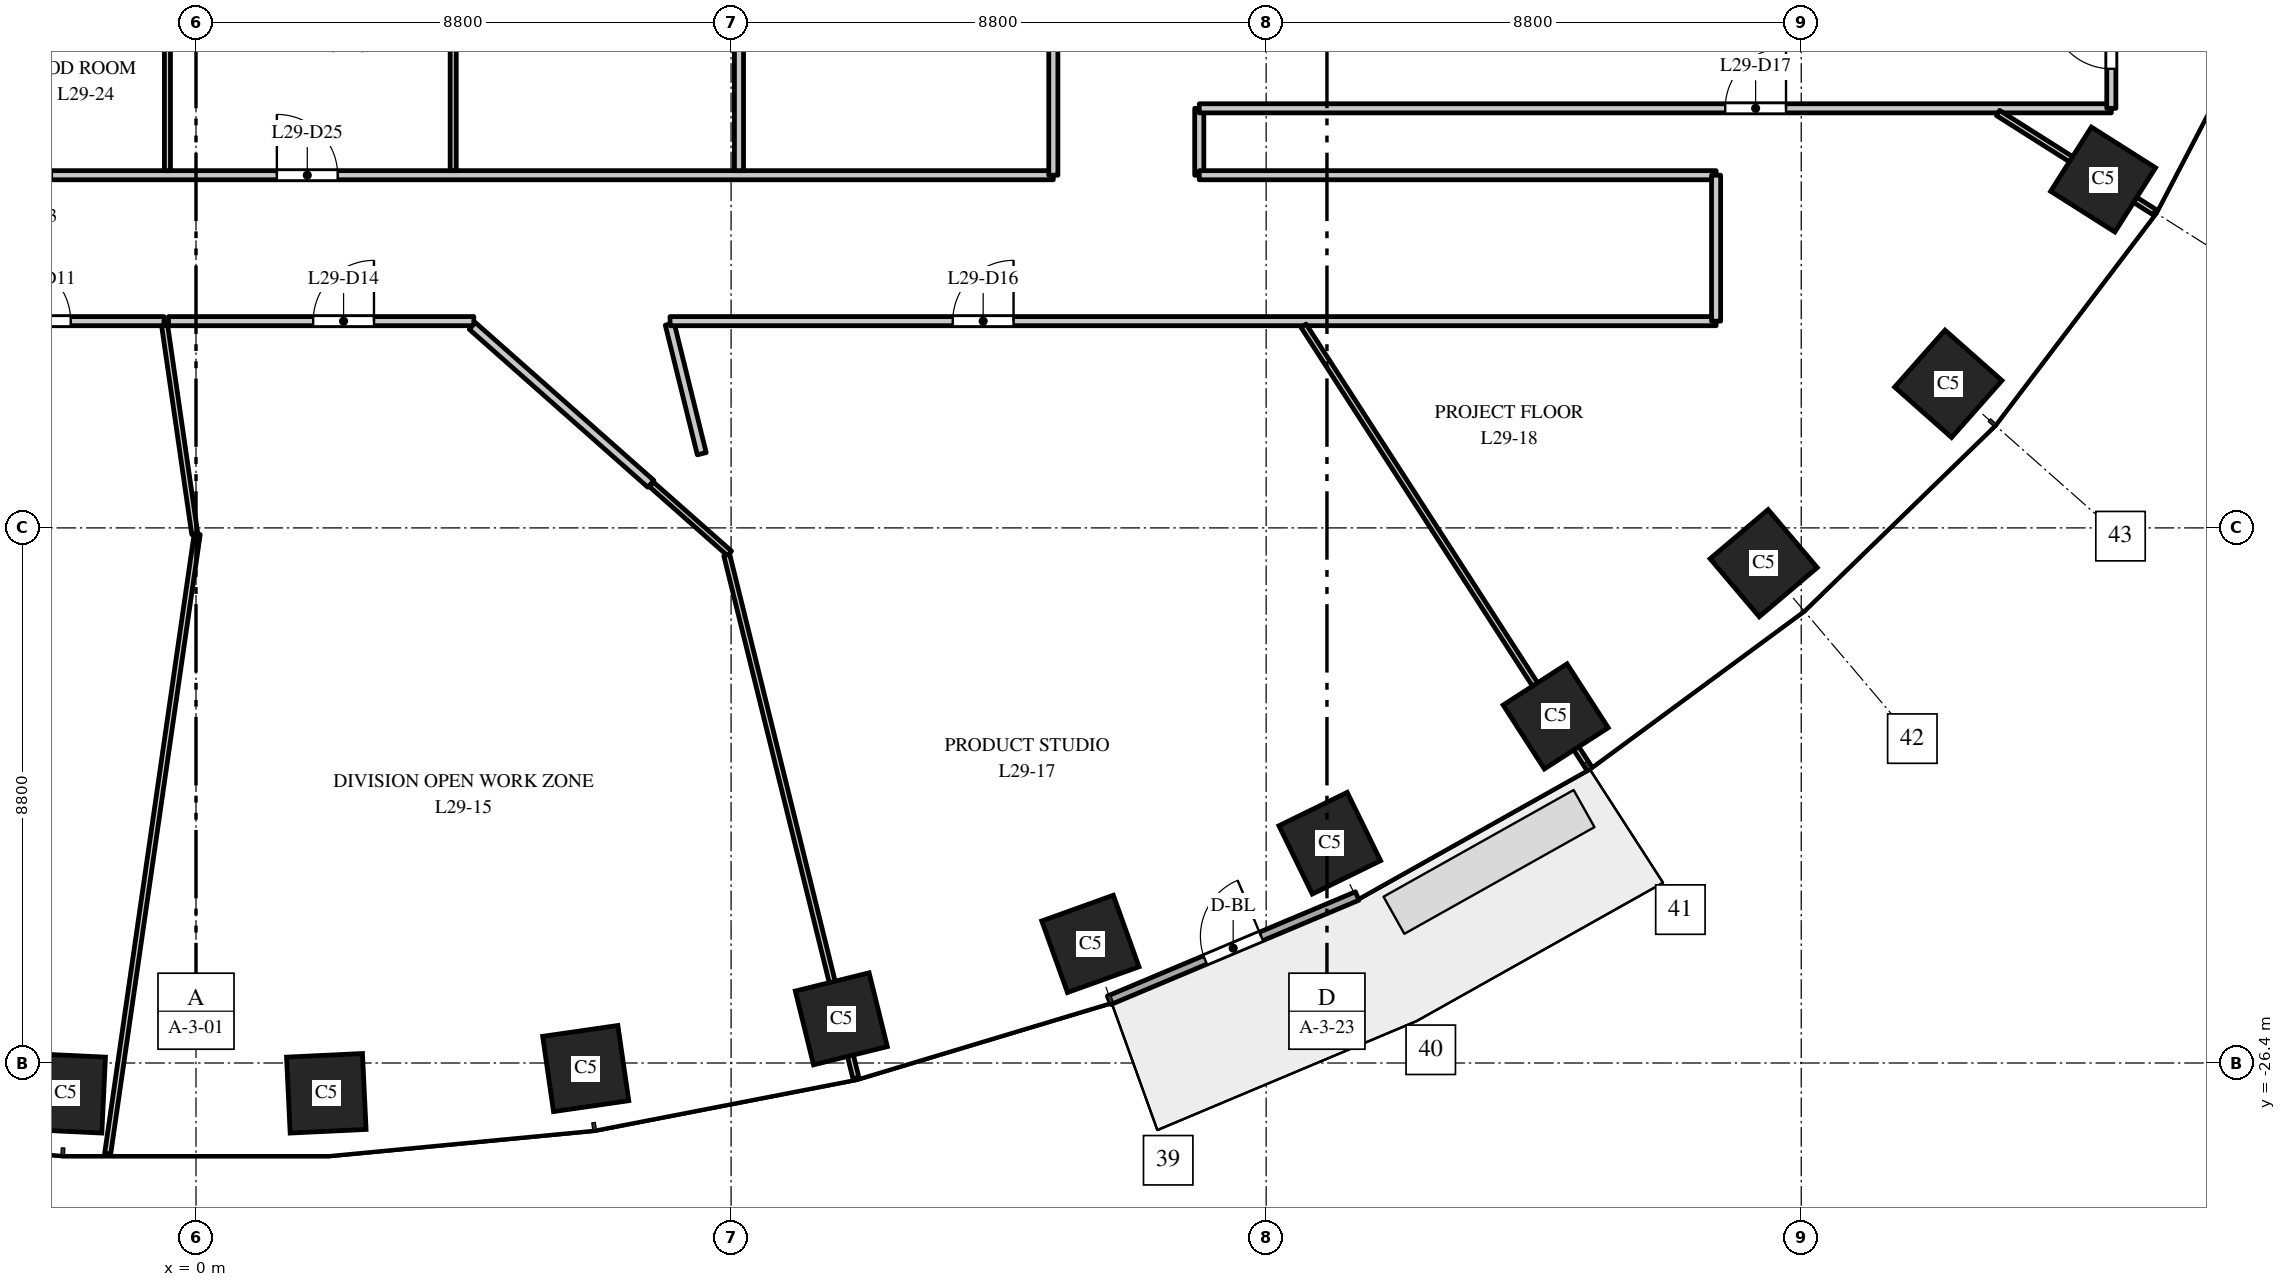
"""IFC4 building model, lengths in metres.
Left out: names, types, materials, properties, quantities, classifications, styles, units other than length and angle.
Written with IfcOpenShell. Run it as: python <this file> out.ifc"""

import sys

from ifc_helpers import new_model, si_unit, direction, frame, frame_2d, origin, origin_2d, place, context, subcontext, project, spatial, rectangle, extrude, element, fill, save


model = new_model("IFC4")
c1 = context("Model", 3, precision=1e-05, world=origin(), true_north=direction((0.0, 1.0)))
c2 = subcontext(c1, "Body", "Model", "MODEL_VIEW")
j1 = project(units=[si_unit("LENGTHUNIT", "METRE"), si_unit("PLANEANGLEUNIT", "RADIAN")], contexts=[c1])
p1 = place(None, origin())
s1 = spatial("IfcSite", under=j1, at=p1, CompositionType="ELEMENT")
p2 = place(p1, origin())
s2 = spatial("IfcBuilding", under=s1, at=p2, CompositionType="ELEMENT")
p3 = place(p2, frame((0.0, 0.0, 128.0)))
s3 = spatial("IfcBuildingStorey", under=s2, at=p3, CompositionType="ELEMENT", Elevation=128.0)
for number, where, z_axis, x_axis in (
    (1, (-2.143, -26.898, 0.0), (0.0, 0.0, 1.0), (0.999, -0.048, 0.0)),
    (2, (2.143, -26.898, 0.0), (0.0, 0.0, 1.0), (0.999, 0.048, 0.0)),
    (3, (6.409, -26.491, 0.0), (0.0, 0.0, 1.0), (0.99, 0.143, 0.0)),
    (4, (10.613, -25.674, 0.0), (0.0, 0.0, 1.0), (0.971, 0.24, 0.0)),
    (5, (14.709, -24.441, 0.0), (0.0, 0.0, 1.0), (0.941, 0.338, 0.0)),
    (6, (18.646, -22.785, 0.0), (0.0, 0.0, 1.0), (0.898, 0.439, 0.0)),
    (7, (22.362, -20.7, 0.0), (0.0, 0.0, 1.0), (0.84, 0.542, 0.0)),
    (8, (25.783, -18.18, 0.0), (0.0, 0.0, 1.0), (0.763, 0.646, 0.0)),
    (9, (28.819, -15.23, 0.0), (0.0, 0.0, 1.0), (0.663, 0.749, 0.0)),
    (10, (31.365, -11.871, 0.0), (0.0, 0.0, 1.0), (0.535, 0.845, 0.0)),
):
    element("IfcColumn", number, at=place(p3, frame(where, z_axis=z_axis, x_axis=x_axis)), inside=s3, PredefinedType="COLUMN", context=c2, shape_type="SweptSolid", body=[
        extrude(rectangle(XDim=1.25, YDim=1.25, at=origin_2d()), origin(), (0.0, 0.0, 1.0), 4.0),
    ])
p4 = place(p3, frame((15.018, -25.369, 0.0), z_axis=(0.0, 0.0, 1.0), x_axis=(0.921816985161, 0.387625393736, 0.0)))
e11 = element("IfcWall", 11, at=p4, inside=s3, PredefinedType="STANDARD", context=c2, shape_type="SweptSolid", body=[
    extrude(rectangle(XDim=4.426, YDim=0.15, at=frame_2d((2.213, 0.0))), origin(), (0.0, 0.0, 1.0), 3.7),
])
p5 = place(p4, frame((1.713, 0.0, 0.0)))
e12 = element("IfcOpeningElement", 12, at=p5, cuts=e11, PredefinedType="OPENING", context=c2, shape_type="SweptSolid", body=[
    extrude(rectangle(XDim=1.0, YDim=2.4, at=frame_2d((0.5, 1.2))), frame((0.0, 0.085, 0.0), z_axis=(0.0, -1.0, 0.0), x_axis=(1.0, 0.0, 0.0)), (0.0, 0.0, 1.0), 0.17),
])
p6 = place(p3, frame((-14.1, -11.8, 0.0), z_axis=(0.0, 0.0, 1.0), x_axis=(1.0, 0.0, 0.0)))
e13 = element("IfcWall", 13, at=p6, inside=s3, PredefinedType="PARTITIONING", context=c2, shape_type="SweptSolid", body=[
    extrude(rectangle(XDim=28.2, YDim=0.15, at=frame_2d((14.1, 0.0))), origin(), (0.0, 0.0, 1.0), 2.85),
])
p7 = place(p6, frame((6.03, 0.0, 0.0)))
e14 = element("IfcOpeningElement", 14, at=p7, cuts=e13, PredefinedType="OPENING", context=c2, shape_type="SweptSolid", body=[
    extrude(rectangle(XDim=1.0, YDim=2.1, at=frame_2d((0.5, 1.05))), frame((0.0, 0.085, 0.0), z_axis=(0.0, -1.0, 0.0), x_axis=(1.0, 0.0, 0.0)), (0.0, 0.0, 1.0), 0.17),
])
p8 = place(p6, frame((10.73, 0.0, 0.0)))
e15 = element("IfcOpeningElement", 15, at=p8, cuts=e13, PredefinedType="OPENING", context=c2, shape_type="SweptSolid", body=[
    extrude(rectangle(XDim=1.0, YDim=2.1, at=frame_2d((0.5, 1.05))), frame((0.0, 0.085, 0.0), z_axis=(0.0, -1.0, 0.0), x_axis=(1.0, 0.0, 0.0)), (0.0, 0.0, 1.0), 0.17),
])
p9 = place(p6, frame((15.43, 0.0, 0.0)))
e16 = element("IfcOpeningElement", 16, at=p9, cuts=e13, PredefinedType="OPENING", context=c2, shape_type="SweptSolid", body=[
    extrude(rectangle(XDim=1.0, YDim=2.1, at=frame_2d((0.5, 1.05))), frame((0.0, 0.085, 0.0), z_axis=(0.0, -1.0, 0.0), x_axis=(1.0, 0.0, 0.0)), (0.0, 0.0, 1.0), 0.17),
])
p10 = place(p3, frame((-10.974, -14.2, 0.0), z_axis=(0.0, 0.0, 1.0), x_axis=(1.0, 0.0, 0.0)))
e17 = element("IfcWall", 17, at=p10, inside=s3, PredefinedType="PARTITIONING", context=c2, shape_type="SweptSolid", body=[
    extrude(rectangle(XDim=10.447, YDim=0.15, at=frame_2d((5.224, 0.0))), origin(), (0.0, 0.0, 1.0), 2.85),
])
p11 = place(p10, frame((7.913, 0.0, 0.0)))
e18 = element("IfcOpeningElement", 18, at=p11, cuts=e17, PredefinedType="OPENING", context=c2, shape_type="SweptSolid", body=[
    extrude(rectangle(XDim=1.0, YDim=2.1, at=frame_2d((0.5, 1.05))), frame((0.0, 0.085, 0.0), z_axis=(0.0, -1.0, 0.0), x_axis=(1.0, 0.0, 0.0)), (0.0, 0.0, 1.0), 0.17),
])
p12 = place(p10, frame((2.835, 0.0, 0.0)))
e19 = element("IfcOpeningElement", 19, at=p12, cuts=e17, PredefinedType="OPENING", context=c2, shape_type="SweptSolid", body=[
    extrude(rectangle(XDim=1.0, YDim=2.1, at=frame_2d((0.5, 1.05))), frame((0.0, 0.085, 0.0), z_axis=(0.0, -1.0, 0.0), x_axis=(1.0, 0.0, 0.0)), (0.0, 0.0, 1.0), 0.17),
])
p13 = place(p3, frame((-1.453, -27.894, 0.0), z_axis=(0.0, 0.0, 1.0), x_axis=(0.143027592995, 0.989718701269, 0.0)))
e20 = element("IfcWall", 20, at=p13, inside=s3, PredefinedType="PARTITIONING", context=c2, shape_type="SweptSolid", body=[
    extrude(rectangle(XDim=10.298, YDim=0.1, at=frame_2d((5.149, 0.0))), origin(), (0.0, 0.0, 1.0), 2.9),
])
p14 = place(p3, frame((-0.516, -14.271, 0.0), z_axis=(0.0, 0.0, 1.0), x_axis=(0.143107167662, -0.9897071984, 0.0)))
e21 = element("IfcWall", 21, at=p14, inside=s3, PredefinedType="PARTITIONING", context=c2, shape_type="SweptSolid", body=[
    extrude(rectangle(XDim=3.467, YDim=0.1, at=frame_2d((1.733, 0.0))), origin(), (0.0, 0.0, 1.0), 3.7),
])
p15 = place(p3, frame((-0.47, -11.725, 0.0), z_axis=(0.0, 0.0, 1.0), x_axis=(0.0, 1.0, 0.0)))
e22 = element("IfcWall", 22, at=p15, inside=s3, PredefinedType="PARTITIONING", context=c2, shape_type="SweptSolid", body=[
    extrude(rectangle(XDim=4.256, YDim=0.1, at=frame_2d((2.128, 0.0))), origin(), (0.0, 0.0, 1.0), 2.9),
])
p16 = place(p3, frame((-0.452, -14.2, 0.0), z_axis=(0.0, 0.0, 1.0), x_axis=(1.0, 0.0, 0.0)))
e23 = element("IfcWall", 23, at=p16, inside=s3, PredefinedType="PARTITIONING", context=c2, shape_type="SweptSolid", body=[
    extrude(rectangle(XDim=5.021, YDim=0.15, at=frame_2d((2.51, 0.0))), origin(), (0.0, 0.0, 1.0), 2.85),
])
p17 = place(p16, frame((2.379, 0.0, 0.0)))
e24 = element("IfcOpeningElement", 24, at=p17, cuts=e23, PredefinedType="OPENING", context=c2, shape_type="SweptSolid", body=[
    extrude(rectangle(XDim=1.0, YDim=2.1, at=frame_2d((0.5, 1.05))), frame((0.0, 0.085, 0.0), z_axis=(0.0, -1.0, 0.0), x_axis=(1.0, 0.0, 0.0)), (0.0, 0.0, 1.0), 0.17),
])
p18 = place(p3, frame((4.23, -11.725, 0.0), z_axis=(0.0, 0.0, 1.0), x_axis=(0.0, 1.0, 0.0)))
e25 = element("IfcWall", 25, at=p18, inside=s3, PredefinedType="PARTITIONING", context=c2, shape_type="SweptSolid", body=[
    extrude(rectangle(XDim=5.133, YDim=0.1, at=frame_2d((2.566, 0.0))), origin(), (0.0, 0.0, 1.0), 2.9),
])
p19 = place(p3, frame((4.544, -14.278, 0.0), z_axis=(0.0, 0.0, 1.0), x_axis=(0.74902508398, -0.662541639121, 0.0)))
e26 = element("IfcWall", 26, at=p19, inside=s3, PredefinedType="PARTITIONING", context=c2, shape_type="SweptSolid", body=[
    extrude(rectangle(XDim=3.921, YDim=0.15, at=frame_2d((1.96, 0.0))), origin(), (0.0, 0.0, 1.0), 3.7),
])
p20 = place(p3, frame((7.49, -16.884, 0.0), z_axis=(0.0, 0.0, 1.0), x_axis=(0.749222216333, -0.662318707688, 0.0)))
e27 = element("IfcWall", 27, at=p20, inside=s3, PredefinedType="PARTITIONING", context=c2, shape_type="SweptSolid", body=[
    extrude(rectangle(XDim=1.714, YDim=0.1, at=frame_2d((0.857, 0.0))), origin(), (0.0, 0.0, 1.0), 3.7),
])
p21 = place(p3, frame((7.791, -14.248, 0.0), z_axis=(0.0, 0.0, 1.0), x_axis=(0.240023599191, -0.97076705333, 0.0)))
e28 = element("IfcWall", 28, at=p21, inside=s3, PredefinedType="PARTITIONING", context=c2, shape_type="SweptSolid", body=[
    extrude(rectangle(XDim=2.196, YDim=0.15, at=frame_2d((1.098, 0.0))), origin(), (0.0, 0.0, 1.0), 3.7),
])
p22 = place(p3, frame((7.796, -14.2, 0.0), z_axis=(0.0, 0.0, 1.0), x_axis=(1.0, 0.0, 0.0)))
e29 = element("IfcWall", 29, at=p22, inside=s3, PredefinedType="PARTITIONING", context=c2, shape_type="SweptSolid", body=[
    extrude(rectangle(XDim=17.204, YDim=0.15, at=frame_2d((8.602, 0.0))), origin(), (0.0, 0.0, 1.0), 2.85),
])
p23 = place(p22, frame((4.65, 0.0, 0.0)))
e30 = element("IfcOpeningElement", 30, at=p23, cuts=e29, PredefinedType="OPENING", context=c2, shape_type="SweptSolid", body=[
    extrude(rectangle(XDim=1.0, YDim=2.1, at=frame_2d((0.5, 1.05))), frame((0.0, 0.085, 0.0), z_axis=(0.0, -1.0, 0.0), x_axis=(1.0, 0.0, 0.0)), (0.0, 0.0, 1.0), 0.17),
])
p24 = place(p3, frame((8.729, -18.046, 0.0), z_axis=(0.0, 0.0, 1.0), x_axis=(0.239772155265, -0.970829188663, 0.0)))
e31 = element("IfcWall", 31, at=p24, inside=s3, PredefinedType="PARTITIONING", context=c2, shape_type="SweptSolid", body=[
    extrude(rectangle(XDim=8.858, YDim=0.1, at=frame_2d((4.429, 0.0))), origin(), (0.0, 0.0, 1.0), 2.9),
])
p25 = place(p3, frame((8.93, -11.725, 0.0), z_axis=(0.0, 0.0, 1.0), x_axis=(0.0, 1.0, 0.0)))
e32 = element("IfcWall", 32, at=p25, inside=s3, PredefinedType="PARTITIONING", context=c2, shape_type="SweptSolid", body=[
    extrude(rectangle(XDim=11.207, YDim=0.15, at=frame_2d((5.604, 0.0))), origin(), (0.0, 0.0, 1.0), 2.75),
])
p26 = place(p25, frame((4.597, 0.0, 0.0)))
e33 = element("IfcOpeningElement", 33, at=p26, cuts=e32, PredefinedType="OPENING", context=c2, shape_type="SweptSolid", body=[
    extrude(rectangle(XDim=1.0, YDim=2.1, at=frame_2d((0.5, 1.05))), frame((0.0, 0.085, 0.0), z_axis=(0.0, -1.0, 0.0), x_axis=(1.0, 0.0, 0.0)), (0.0, 0.0, 1.0), 0.17),
])
p27 = place(p3, frame((14.1, -11.8, 0.0), z_axis=(0.0, 0.0, 1.0), x_axis=(0.0, 1.0, 0.0)))
e34 = element("IfcWall", 34, at=p27, inside=s3, PredefinedType="PARTITIONING", context=c2, shape_type="SweptSolid", body=[
    extrude(rectangle(XDim=23.6, YDim=0.15, at=frame_2d((11.8, 0.0))), origin(), (0.0, 0.0, 1.0), 2.75),
])
p28 = place(p27, frame((11.2, 0.0, 0.0)))
e35 = element("IfcOpeningElement", 35, at=p28, cuts=e34, PredefinedType="OPENING", context=c2, shape_type="SweptSolid", body=[
    extrude(rectangle(XDim=1.0, YDim=2.1, at=frame_2d((0.5, 1.05))), frame((0.0, 0.085, 0.0), z_axis=(0.0, -1.0, 0.0), x_axis=(1.0, 0.0, 0.0)), (0.0, 0.0, 1.0), 0.17),
])
p29 = place(p3, frame((16.5, -11.8, 0.0), z_axis=(0.0, 0.0, 1.0), x_axis=(0.0, 1.0, 0.0)))
e36 = element("IfcWall", 36, at=p29, inside=s3, PredefinedType="PARTITIONING", context=c2, shape_type="SweptSolid", body=[
    extrude(rectangle(XDim=1.1, YDim=0.15, at=frame_2d((0.55, 0.0))), origin(), (0.0, 0.0, 1.0), 3.7),
])
p30 = place(p3, frame((16.5, -11.8, 0.0), z_axis=(0.0, 0.0, 1.0), x_axis=(1.0, 0.0, 0.0)))
e37 = element("IfcWall", 37, at=p30, inside=s3, PredefinedType="PARTITIONING", context=c2, shape_type="SweptSolid", body=[
    extrude(rectangle(XDim=8.5, YDim=0.15, at=frame_2d((4.25, 0.0))), origin(), (0.0, 0.0, 1.0), 2.75),
])
p31 = place(p3, frame((16.5, -10.7, 0.0), z_axis=(0.0, 0.0, 1.0), x_axis=(1.0, 0.0, 0.0)))
e38 = element("IfcWall", 38, at=p31, inside=s3, PredefinedType="PARTITIONING", context=c2, shape_type="SweptSolid", body=[
    extrude(rectangle(XDim=15.0, YDim=0.15, at=frame_2d((7.5, 0.0))), origin(), (0.0, 0.0, 1.0), 2.75),
])
p32 = place(p31, frame((8.65, 0.0, 0.0)))
e39 = element("IfcOpeningElement", 39, at=p32, cuts=e38, PredefinedType="OPENING", context=c2, shape_type="SweptSolid", body=[
    extrude(rectangle(XDim=1.0, YDim=2.1, at=frame_2d((0.5, 1.05))), frame((0.0, 0.085, 0.0), z_axis=(0.0, -1.0, 0.0), x_axis=(1.0, 0.0, 0.0)), (0.0, 0.0, 1.0), 0.17),
])
p33 = place(p3, frame((18.215, -14.275, 0.0), z_axis=(0.0, 0.0, 1.0), x_axis=(0.542249023969, -0.840217826521, 0.0)))
e40 = element("IfcWall", 40, at=p33, inside=s3, PredefinedType="PARTITIONING", context=c2, shape_type="SweptSolid", body=[
    extrude(rectangle(XDim=8.649, YDim=0.1, at=frame_2d((4.325, 0.0))), origin(), (0.0, 0.0, 1.0), 3.7),
])
p34 = place(p3, frame((25.0, -14.2, 0.0), z_axis=(0.0, 0.0, 1.0), x_axis=(0.0, 1.0, 0.0)))
e41 = element("IfcWall", 41, at=p34, inside=s3, PredefinedType="PARTITIONING", context=c2, shape_type="SweptSolid", body=[
    extrude(rectangle(XDim=2.4, YDim=0.15, at=frame_2d((1.2, 0.0))), origin(), (0.0, 0.0, 1.0), 2.75),
])
p35 = place(p3, frame((29.637, -10.777, 0.0), z_axis=(0.0, 0.0, 1.0), x_axis=(0.844810627195, -0.535065420467, 0.0)))
e42 = element("IfcWall", 42, at=p35, inside=s3, PredefinedType="PARTITIONING", context=c2, shape_type="SweptSolid", body=[
    extrude(rectangle(XDim=3.048, YDim=0.1, at=frame_2d((1.524, 0.0))), origin(), (0.0, 0.0, 1.0), 2.9),
])
p36 = place(p3, frame((31.5, -10.7, 0.0), z_axis=(0.0, 0.0, 1.0), x_axis=(0.0, 1.0, 0.0)))
e43 = element("IfcWall", 43, at=p36, inside=s3, PredefinedType="PARTITIONING", context=c2, shape_type="SweptSolid", body=[
    extrude(rectangle(XDim=2.2, YDim=0.15, at=frame_2d((1.1, 0.0))), origin(), (0.0, 0.0, 1.0), 2.9),
])
p37 = place(p36, frame((0.65, 0.0, 0.0)))
e44 = element("IfcOpeningElement", 44, at=p37, cuts=e43, PredefinedType="OPENING", context=c2, shape_type="SweptSolid", body=[
    extrude(rectangle(XDim=1.0, YDim=2.1, at=frame_2d((0.5, 1.05))), frame((0.0, 0.085, 0.0), z_axis=(0.0, -1.0, 0.0), x_axis=(1.0, 0.0, 0.0)), (0.0, 0.0, 1.0), 0.17),
])
p38 = place(p5, origin())
e45 = element("IfcDoor", 45, at=p38, inside=s3, OperationType="SINGLE_SWING_RIGHT", PredefinedType="DOOR", context=c2, shape_type="SweptSolid", body=[
    extrude(rectangle(XDim=1.0, YDim=2.4, at=frame_2d((0.5, 1.2))), frame((0.0, 0.025, 0.0), z_axis=(0.0, -1.0, 0.0), x_axis=(1.0, 0.0, 0.0)), (0.0, 0.0, 1.0), 0.05),
])
fill(e12, e45)
p39 = place(p11, origin())
e46 = element("IfcDoor", 46, at=p39, inside=s3, OperationType="SINGLE_SWING_LEFT", PredefinedType="DOOR", context=c2, shape_type="SweptSolid", body=[
    extrude(rectangle(XDim=1.0, YDim=2.1, at=frame_2d((0.5, 1.05))), frame((0.0, 0.025, 0.0), z_axis=(0.0, -1.0, 0.0), x_axis=(1.0, 0.0, 0.0)), (0.0, 0.0, 1.0), 0.05),
])
fill(e18, e46)
p40 = place(p17, origin())
e47 = element("IfcDoor", 47, at=p40, inside=s3, OperationType="SINGLE_SWING_RIGHT", PredefinedType="DOOR", context=c2, shape_type="SweptSolid", body=[
    extrude(rectangle(XDim=1.0, YDim=2.1, at=frame_2d((0.5, 1.05))), frame((0.0, 0.025, 0.0), z_axis=(0.0, -1.0, 0.0), x_axis=(1.0, 0.0, 0.0)), (0.0, 0.0, 1.0), 0.05),
])
fill(e24, e47)
p41 = place(p23, origin())
e48 = element("IfcDoor", 48, at=p41, inside=s3, OperationType="SINGLE_SWING_RIGHT", PredefinedType="DOOR", context=c2, shape_type="SweptSolid", body=[
    extrude(rectangle(XDim=1.0, YDim=2.1, at=frame_2d((0.5, 1.05))), frame((0.0, 0.025, 0.0), z_axis=(0.0, -1.0, 0.0), x_axis=(1.0, 0.0, 0.0)), (0.0, 0.0, 1.0), 0.05),
])
fill(e30, e48)
p42 = place(p32, origin())
e49 = element("IfcDoor", 49, at=p42, inside=s3, OperationType="SINGLE_SWING_RIGHT", PredefinedType="DOOR", context=c2, shape_type="SweptSolid", body=[
    extrude(rectangle(XDim=1.0, YDim=2.1, at=frame_2d((0.5, 1.05))), frame((0.0, 0.025, 0.0), z_axis=(0.0, -1.0, 0.0), x_axis=(1.0, 0.0, 0.0)), (0.0, 0.0, 1.0), 0.05),
])
fill(e39, e49)
p43 = place(p37, origin())
e50 = element("IfcDoor", 50, at=p43, inside=s3, OperationType="SINGLE_SWING_RIGHT", PredefinedType="DOOR", context=c2, shape_type="SweptSolid", body=[
    extrude(rectangle(XDim=1.0, YDim=2.1, at=frame_2d((0.5, 1.05))), frame((0.0, 0.025, 0.0), z_axis=(0.0, -1.0, 0.0), x_axis=(1.0, 0.0, 0.0)), (0.0, 0.0, 1.0), 0.05),
])
fill(e44, e50)
p44 = place(p9, origin())
e51 = element("IfcDoor", 51, at=p44, inside=s3, OperationType="SINGLE_SWING_LEFT", PredefinedType="DOOR", context=c2, shape_type="SweptSolid", body=[
    extrude(rectangle(XDim=1.0, YDim=2.1, at=frame_2d((0.5, 1.05))), frame((0.0, 0.025, 0.0), z_axis=(0.0, -1.0, 0.0), x_axis=(1.0, 0.0, 0.0)), (0.0, 0.0, 1.0), 0.05),
])
fill(e16, e51)
save(model, sys.argv[1])
